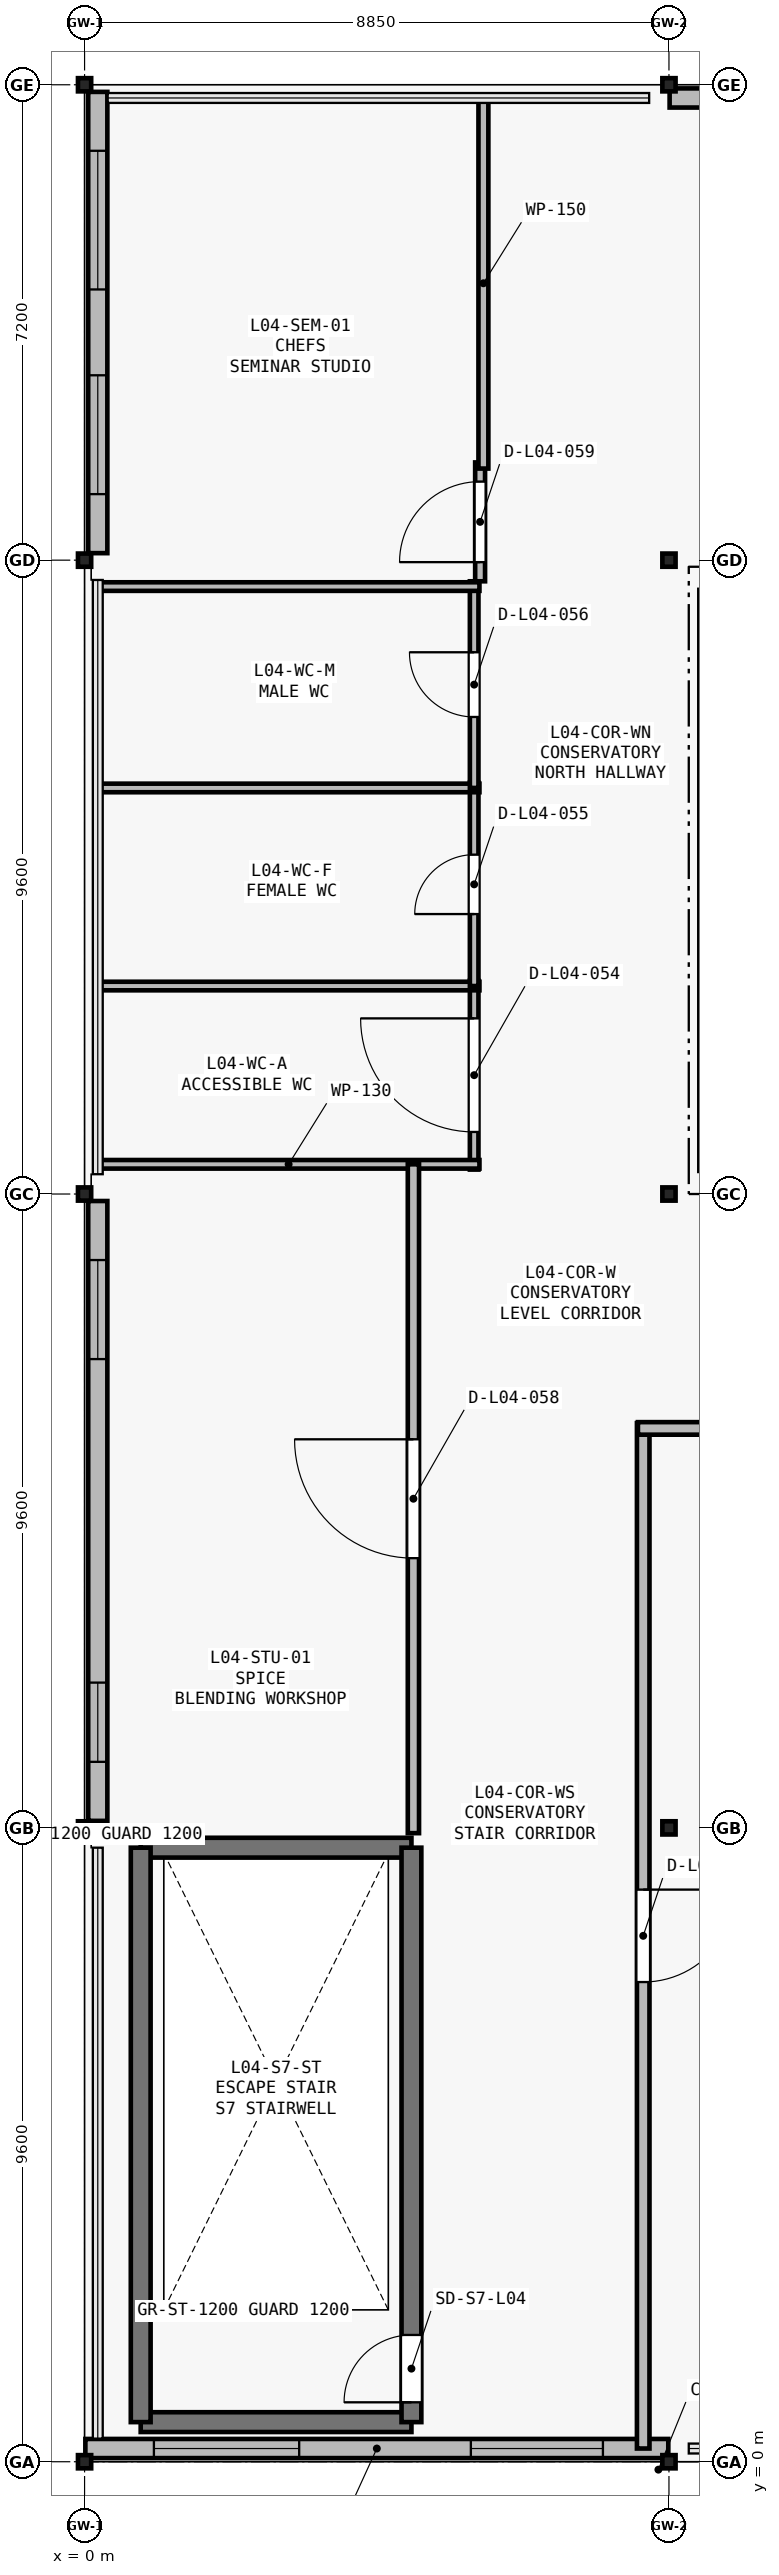
"""IFC4 building model, lengths in metres.
Left out: names, types, materials, properties, quantities, classifications, styles, units other than length and angle.
Written with IfcOpenShell. Run it as: python <this file> out.ifc"""

import sys

from ifc_helpers import new_model, si_unit, direction, frame, frame_2d, origin, origin_2d, place, context, subcontext, project, spatial, rectangle, i_section, extrude, element, fill, save


model = new_model("IFC4")
c1 = context("Model", 3, precision=1e-05, world=origin(), true_north=direction((0.0, 1.0)))
c2 = subcontext(c1, "Body", "Model", "MODEL_VIEW")
j1 = project(units=[si_unit("LENGTHUNIT", "METRE"), si_unit("PLANEANGLEUNIT", "RADIAN")], contexts=[c1])
p1 = place(None, origin())
s1 = spatial("IfcSite", under=j1, at=p1, CompositionType="ELEMENT")
p2 = place(p1, origin())
s2 = spatial("IfcBuilding", under=s1, at=p2, CompositionType="ELEMENT")
p3 = place(p2, frame((0.0, 0.0, 19.2)))
s3 = spatial("IfcBuildingStorey", under=s2, at=p3, CompositionType="ELEMENT", Elevation=19.2)
for number, where, z_axis, x_axis in (
    (1, (0.0, 0.0, 0.0), (0.0, 0.0, 1.0), (1.0, 0.0, 0.0)),
    (2, (0.0, 9.6, 0.0), (0.0, 0.0, 1.0), (1.0, 0.0, 0.0)),
    (3, (0.0, 19.2, 0.0), (0.0, 0.0, 1.0), (1.0, 0.0, 0.0)),
    (4, (0.0, 28.8, 0.0), (0.0, 0.0, 1.0), (1.0, 0.0, 0.0)),
    (5, (0.0, 36.0, 0.0), (0.0, 0.0, 1.0), (1.0, 0.0, 0.0)),
    (6, (8.85, 0.0, 0.0), (0.0, 0.0, 1.0), (1.0, 0.0, 0.0)),
    (7, (8.85, 9.6, 0.0), (0.0, 0.0, 1.0), (1.0, 0.0, 0.0)),
    (8, (8.85, 19.2, 0.0), (0.0, 0.0, 1.0), (1.0, 0.0, 0.0)),
    (9, (8.85, 28.8, 0.0), (0.0, 0.0, 1.0), (1.0, 0.0, 0.0)),
    (10, (8.85, 36.0, 0.0), (0.0, 0.0, 1.0), (1.0, 0.0, 0.0)),
):
    element("IfcColumn", number, at=place(p3, frame(where, z_axis=z_axis, x_axis=x_axis)), inside=s3, PredefinedType="COLUMN", context=c2, shape_type="SweptSolid", body=[
        extrude(i_section(OverallWidth=0.2, OverallDepth=0.2, WebThickness=0.008, FlangeThickness=0.012, FilletRadius=0.013, at=origin_2d()), origin(), (0.0, 0.0, 1.0), 4.2),
    ])
p4 = place(p3, frame((8.84, 0.2, 0.0), z_axis=(0.0, 0.0, 1.0), x_axis=(-1.0, 0.0, 0.0)))
e11 = element("IfcWall", 11, at=p4, inside=s3, PredefinedType="SOLIDWALL", context=c2, shape_type="SweptSolid", body=[
    extrude(rectangle(XDim=8.828, YDim=0.29, at=frame_2d((4.414, 0.0))), origin(), (0.0, 0.0, 1.0), 3.35),
])
p5 = place(p4, frame((0.99, 0.0, 0.95)))
e12 = element("IfcOpeningElement", 12, at=p5, cuts=e11, PredefinedType="OPENING", context=c2, shape_type="SweptSolid", body=[
    extrude(rectangle(XDim=2.0, YDim=2.1, at=frame_2d((1.0, 1.05))), frame((0.0, 0.155, 0.0), z_axis=(0.0, -1.0, 0.0), x_axis=(1.0, 0.0, 0.0)), (0.0, 0.0, 1.0), 0.31),
])
p6 = place(p4, frame((5.59, 0.0, 0.95)))
e13 = element("IfcOpeningElement", 13, at=p6, cuts=e11, PredefinedType="OPENING", context=c2, shape_type="SweptSolid", body=[
    extrude(rectangle(XDim=2.2, YDim=2.1, at=frame_2d((1.1, 1.05))), frame((0.0, 0.155, 0.0), z_axis=(0.0, -1.0, 0.0), x_axis=(1.0, 0.0, 0.0)), (0.0, 0.0, 1.0), 0.31),
])
p7 = place(p3, frame((0.2, 9.706, 0.0), z_axis=(0.0, 0.0, 1.0), x_axis=(0.0, 1.0, 0.0)))
e14 = element("IfcWall", 14, at=p7, inside=s3, PredefinedType="SOLIDWALL", context=c2, shape_type="SweptSolid", body=[
    extrude(rectangle(XDim=9.388, YDim=0.29, at=frame_2d((4.694, 0.0))), origin(), (0.0, 0.0, 1.0), 3.35),
])
p8 = place(p7, frame((0.894, 0.0, 0.95)))
e15 = element("IfcOpeningElement", 15, at=p8, cuts=e14, PredefinedType="OPENING", context=c2, shape_type="SweptSolid", body=[
    extrude(rectangle(XDim=1.2, YDim=1.2, at=frame_2d((0.6, 0.6))), frame((0.0, 0.155, 0.0), z_axis=(0.0, -1.0, 0.0), x_axis=(1.0, 0.0, 0.0)), (0.0, 0.0, 1.0), 0.31),
])
p9 = place(p7, frame((6.994, 0.0, 0.95)))
e16 = element("IfcOpeningElement", 16, at=p9, cuts=e14, PredefinedType="OPENING", context=c2, shape_type="SweptSolid", body=[
    extrude(rectangle(XDim=1.5, YDim=1.2, at=frame_2d((0.75, 0.6))), frame((0.0, 0.155, 0.0), z_axis=(0.0, -1.0, 0.0), x_axis=(1.0, 0.0, 0.0)), (0.0, 0.0, 1.0), 0.31),
])
p10 = place(p3, frame((0.2, 28.906, 0.0), z_axis=(0.0, 0.0, 1.0), x_axis=(0.0, 1.0, 0.0)))
e17 = element("IfcWall", 17, at=p10, inside=s3, PredefinedType="SOLIDWALL", context=c2, shape_type="SweptSolid", body=[
    extrude(rectangle(XDim=6.986, YDim=0.29, at=frame_2d((3.493, 0.0))), origin(), (0.0, 0.0, 1.0), 3.35),
])
p11 = place(p10, frame((0.894, 0.0, 0.95)))
e18 = element("IfcOpeningElement", 18, at=p11, cuts=e17, PredefinedType="OPENING", context=c2, shape_type="SweptSolid", body=[
    extrude(rectangle(XDim=1.8, YDim=1.2, at=frame_2d((0.9, 0.6))), frame((0.0, 0.155, 0.0), z_axis=(0.0, -1.0, 0.0), x_axis=(1.0, 0.0, 0.0)), (0.0, 0.0, 1.0), 0.31),
])
p12 = place(p10, frame((3.994, 0.0, 0.95)))
e19 = element("IfcOpeningElement", 19, at=p12, cuts=e17, PredefinedType="OPENING", context=c2, shape_type="SweptSolid", body=[
    extrude(rectangle(XDim=2.1, YDim=1.2, at=frame_2d((1.05, 0.6))), frame((0.0, 0.155, 0.0), z_axis=(0.0, -1.0, 0.0), x_axis=(1.0, 0.0, 0.0)), (0.0, 0.0, 1.0), 0.31),
])
p13 = place(p3, frame((8.86, 35.8, 0.0), z_axis=(0.0, 0.0, 1.0), x_axis=(1.0, 0.0, 0.0)))
e20 = element("IfcWall", 20, at=p13, inside=s3, PredefinedType="SOLIDWALL", context=c2, shape_type="SweptSolid", body=[
    extrude(rectangle(XDim=8.612, YDim=0.29, at=frame_2d((4.306, 0.0))), origin(), (0.0, 0.0, 1.0), 3.35),
])
p14 = place(p13, frame((0.99, 0.0, 0.95)))
e21 = element("IfcOpeningElement", 21, at=p14, cuts=e20, PredefinedType="OPENING", context=c2, shape_type="SweptSolid", body=[
    extrude(rectangle(XDim=0.85, YDim=1.5, at=frame_2d((0.425, 0.75))), frame((0.0, 0.155, 0.0), z_axis=(0.0, -1.0, 0.0), x_axis=(1.0, 0.0, 0.0)), (0.0, 0.0, 1.0), 0.31),
])
p15 = place(p13, frame((6.69, 0.0, 0.95)))
e22 = element("IfcOpeningElement", 22, at=p15, cuts=e20, PredefinedType="OPENING", context=c2, shape_type="SweptSolid", body=[
    extrude(rectangle(XDim=1.15, YDim=1.5, at=frame_2d((0.575, 0.75))), frame((0.0, 0.155, 0.0), z_axis=(0.0, -1.0, 0.0), x_axis=(1.0, 0.0, 0.0)), (0.0, 0.0, 1.0), 0.31),
])
for number, where, z_axis, x_axis in (
    (23, (0.85, 0.6, 0.0), (0.0, 0.0, 1.0), (1.0, 0.0, 0.0)),
    (24, (4.95, 9.3, 0.0), (0.0, 0.0, 1.0), (-1.0, 0.0, 0.0)),
):
    element("IfcWall", number, at=place(p3, frame(where, z_axis=z_axis, x_axis=x_axis)), inside=s3, PredefinedType="SHEAR", context=c2, shape_type="SweptSolid", body=[
        extrude(rectangle(XDim=4.1, YDim=0.3, at=frame_2d((2.05, 0.0))), origin(), (0.0, 0.0, 1.0), 4.2),
    ])
p16 = place(p3, frame((0.85, 9.3, 0.0), z_axis=(0.0, 0.0, 1.0), x_axis=(0.0, -1.0, 0.0)))
e25 = element("IfcWall", 25, at=p16, inside=s3, PredefinedType="SHEAR", context=c2, shape_type="SweptSolid", body=[
    extrude(rectangle(XDim=8.7, YDim=0.3, at=frame_2d((4.35, 0.0))), origin(), (0.0, 0.0, 1.0), 4.2),
])
p17 = place(p3, frame((4.95, 0.6, 0.0), z_axis=(0.0, 0.0, 1.0), x_axis=(0.0, 1.0, 0.0)))
e26 = element("IfcWall", 26, at=p17, inside=s3, PredefinedType="SHEAR", context=c2, shape_type="SweptSolid", body=[
    extrude(rectangle(XDim=8.7, YDim=0.3, at=frame_2d((4.35, 0.0))), origin(), (0.0, 0.0, 1.0), 4.2),
])
p18 = place(p17, frame((0.3, 0.0, 0.0)))
e27 = element("IfcOpeningElement", 27, at=p18, cuts=e26, PredefinedType="OPENING", context=c2, shape_type="SweptSolid", body=[
    extrude(rectangle(XDim=1.02, YDim=2.1, at=frame_2d((0.51, 1.05))), frame((0.0, 0.16, 0.0), z_axis=(0.0, -1.0, 0.0), x_axis=(1.0, 0.0, 0.0)), (0.0, 0.0, 1.0), 0.32),
])
p19 = place(p3, frame((5.9, 19.57, 0.0), z_axis=(0.0, 0.0, 1.0), x_axis=(0.0, 1.0, 0.0)))
e28 = element("IfcWall", 28, at=p19, inside=s3, PredefinedType="PARTITIONING", context=c2, shape_type="SweptSolid", body=[
    extrude(rectangle(XDim=2.86, YDim=0.13, at=frame_2d((1.43, 0.0))), origin(), (0.0, 0.0, 1.0), 3.55),
])
p20 = place(p19, frame((0.57, 0.0, 0.0)))
e29 = element("IfcOpeningElement", 29, at=p20, cuts=e28, PredefinedType="OPENING", context=c2, shape_type="SweptSolid", body=[
    extrude(rectangle(XDim=1.72, YDim=2.32, at=frame_2d((0.86, 1.16))), frame((0.0, 0.075, 0.0), z_axis=(0.0, -1.0, 0.0), x_axis=(1.0, 0.0, 0.0)), (0.0, 0.0, 1.0), 0.15),
])
for number, where, z_axis, x_axis in (
    (30, (0.2, 19.65, 0.0), (0.0, 0.0, 1.0), (1.0, 0.0, 0.0)),
    (31, (5.98, 22.35, 0.0), (0.0, 0.0, 1.0), (-1.0, 0.0, 0.0)),
):
    element("IfcWall", number, at=place(p3, frame(where, z_axis=z_axis, x_axis=x_axis)), inside=s3, PredefinedType="PARTITIONING", context=c2, shape_type="SweptSolid", body=[
        extrude(rectangle(XDim=5.78, YDim=0.13, at=frame_2d((2.89, 0.0))), origin(), (0.0, 0.0, 1.0), 3.72),
    ])
p21 = place(p3, frame((5.9, 22.35, 0.0), z_axis=(0.0, 0.0, 1.0), x_axis=(0.0, 1.0, 0.0)))
e32 = element("IfcWall", 32, at=p21, inside=s3, PredefinedType="PARTITIONING", context=c2, shape_type="SweptSolid", body=[
    extrude(rectangle(XDim=3.08, YDim=0.13, at=frame_2d((1.54, 0.0))), origin(), (0.0, 0.0, 1.0), 3.55),
])
p22 = place(p21, frame((1.09, 0.0, 0.0)))
e33 = element("IfcOpeningElement", 33, at=p22, cuts=e32, PredefinedType="OPENING", context=c2, shape_type="SweptSolid", body=[
    extrude(rectangle(XDim=0.9, YDim=2.36, at=frame_2d((0.45, 1.18))), frame((0.0, 0.075, 0.0), z_axis=(0.0, -1.0, 0.0), x_axis=(1.0, 0.0, 0.0)), (0.0, 0.0, 1.0), 0.15),
])
p23 = place(p3, frame((5.98, 25.35, 0.0), z_axis=(0.0, 0.0, 1.0), x_axis=(-1.0, 0.0, 0.0)))
e34 = element("IfcWall", 34, at=p23, inside=s3, PredefinedType="PARTITIONING", context=c2, shape_type="SweptSolid", body=[
    extrude(rectangle(XDim=5.78, YDim=0.13, at=frame_2d((2.89, 0.0))), origin(), (0.0, 0.0, 1.0), 3.72),
])
p24 = place(p3, frame((5.9, 25.35, 0.0), z_axis=(0.0, 0.0, 1.0), x_axis=(0.0, 1.0, 0.0)))
e35 = element("IfcWall", 35, at=p24, inside=s3, PredefinedType="PARTITIONING", context=c2, shape_type="SweptSolid", body=[
    extrude(rectangle(XDim=3.13, YDim=0.13, at=frame_2d((1.565, 0.0))), origin(), (0.0, 0.0, 1.0), 3.55),
])
p25 = place(p24, frame((1.075, 0.0, 0.0)))
e36 = element("IfcOpeningElement", 36, at=p25, cuts=e35, PredefinedType="OPENING", context=c2, shape_type="SweptSolid", body=[
    extrude(rectangle(XDim=0.98, YDim=2.36, at=frame_2d((0.49, 1.18))), frame((0.0, 0.075, 0.0), z_axis=(0.0, -1.0, 0.0), x_axis=(1.0, 0.0, 0.0)), (0.0, 0.0, 1.0), 0.15),
])
p26 = place(p3, frame((5.98, 28.4, 0.0), z_axis=(0.0, 0.0, 1.0), x_axis=(-1.0, 0.0, 0.0)))
e37 = element("IfcWall", 37, at=p26, inside=s3, PredefinedType="PARTITIONING", context=c2, shape_type="SweptSolid", body=[
    extrude(rectangle(XDim=5.78, YDim=0.13, at=frame_2d((2.89, 0.0))), origin(), (0.0, 0.0, 1.0), 3.72),
])
p27 = place(p3, frame((8.46, 15.73, 0.0), z_axis=(0.0, 0.0, 1.0), x_axis=(0.0, -1.0, 0.0)))
e38 = element("IfcWall", 38, at=p27, inside=s3, PredefinedType="PARTITIONING", context=c2, shape_type="SweptSolid", body=[
    extrude(rectangle(XDim=15.53, YDim=0.19, at=frame_2d((7.765, 0.0))), origin(), (0.0, 0.0, 1.0), 3.72),
])
p28 = place(p27, frame((7.065, 0.0, 0.0)))
e39 = element("IfcOpeningElement", 39, at=p28, cuts=e38, PredefinedType="OPENING", context=c2, shape_type="SweptSolid", body=[
    extrude(rectangle(XDim=1.4, YDim=2.38, at=frame_2d((0.7, 1.19))), frame((0.0, 0.105, 0.0), z_axis=(0.0, -1.0, 0.0), x_axis=(1.0, 0.0, 0.0)), (0.0, 0.0, 1.0), 0.21),
])
p29 = place(p3, frame((17.5, 15.65, 0.0), z_axis=(0.0, 0.0, 1.0), x_axis=(-1.0, 0.0, 0.0)))
e40 = element("IfcWall", 40, at=p29, inside=s3, PredefinedType="PARTITIONING", context=c2, shape_type="SweptSolid", body=[
    extrude(rectangle(XDim=9.12, YDim=0.19, at=frame_2d((4.56, 0.0))), origin(), (0.0, 0.0, 1.0), 3.72),
])
p30 = place(p3, frame((4.98, 9.52, 0.0), z_axis=(0.0, 0.0, 1.0), x_axis=(0.0, 1.0, 0.0)))
e41 = element("IfcWall", 41, at=p30, inside=s3, PredefinedType="PARTITIONING", context=c2, shape_type="SweptSolid", body=[
    extrude(rectangle(XDim=10.13, YDim=0.17, at=frame_2d((5.065, 0.0))), origin(), (0.0, 0.0, 1.0), 3.72),
])
p31 = place(p30, frame((4.165, 0.0, 0.0)))
e42 = element("IfcOpeningElement", 42, at=p31, cuts=e41, PredefinedType="OPENING", context=c2, shape_type="SweptSolid", body=[
    extrude(rectangle(XDim=1.8, YDim=2.42, at=frame_2d((0.9, 1.21))), frame((0.0, 0.095, 0.0), z_axis=(0.0, -1.0, 0.0), x_axis=(1.0, 0.0, 0.0)), (0.0, 0.0, 1.0), 0.19),
])
p32 = place(p3, frame((5.99, 28.48, 0.0), z_axis=(0.0, 0.0, 1.0), x_axis=(0.0, 1.0, 0.0)))
e43 = element("IfcWall", 43, at=p32, inside=s3, PredefinedType="PARTITIONING", context=c2, shape_type="SweptSolid", body=[
    extrude(rectangle(XDim=1.8, YDim=0.15, at=frame_2d((0.9, 0.0))), origin(), (0.0, 0.0, 1.0), 3.65),
])
p33 = place(p32, frame((0.29, 0.0, 0.0)))
e44 = element("IfcOpeningElement", 44, at=p33, cuts=e43, PredefinedType="OPENING", context=c2, shape_type="SweptSolid", body=[
    extrude(rectangle(XDim=1.22, YDim=2.36, at=frame_2d((0.61, 1.18))), frame((0.0, 0.085, 0.0), z_axis=(0.0, -1.0, 0.0), x_axis=(1.0, 0.0, 0.0)), (0.0, 0.0, 1.0), 0.17),
])
p34 = place(p3, frame((6.04, 30.187, 0.0), z_axis=(0.0, 0.0, 1.0), x_axis=(0.0, 1.0, 0.0)))
e45 = element("IfcWall", 45, at=p34, inside=s3, PredefinedType="PARTITIONING", context=c2, shape_type="SweptSolid", body=[
    extrude(rectangle(XDim=5.613, YDim=0.15, at=frame_2d((2.807, 0.0))), origin(), (0.0, 0.0, 1.0), 3.65),
])
p35 = place(p5, origin())
e46 = element("IfcWindow", 46, at=p35, inside=s3, PartitioningType="SINGLE_PANEL", PredefinedType="WINDOW", context=c2, shape_type="SweptSolid", body=[
    extrude(rectangle(XDim=2.0, YDim=2.1, at=frame_2d((1.0, 1.05))), frame((0.0, 0.03, 0.0), z_axis=(0.0, -1.0, 0.0), x_axis=(1.0, 0.0, 0.0)), (0.0, 0.0, 1.0), 0.06),
])
fill(e12, e46)
p36 = place(p6, origin())
e47 = element("IfcWindow", 47, at=p36, inside=s3, PartitioningType="SINGLE_PANEL", PredefinedType="WINDOW", context=c2, shape_type="SweptSolid", body=[
    extrude(rectangle(XDim=2.2, YDim=2.1, at=frame_2d((1.1, 1.05))), frame((0.0, 0.03, 0.0), z_axis=(0.0, -1.0, 0.0), x_axis=(1.0, 0.0, 0.0)), (0.0, 0.0, 1.0), 0.06),
])
fill(e13, e47)
p37 = place(p8, origin())
e48 = element("IfcWindow", 48, at=p37, inside=s3, PartitioningType="SINGLE_PANEL", PredefinedType="WINDOW", context=c2, shape_type="SweptSolid", body=[
    extrude(rectangle(XDim=1.2, YDim=1.2, at=frame_2d((0.6, 0.6))), frame((0.0, 0.03, 0.0), z_axis=(0.0, -1.0, 0.0), x_axis=(1.0, 0.0, 0.0)), (0.0, 0.0, 1.0), 0.06),
])
fill(e15, e48)
p38 = place(p9, origin())
e49 = element("IfcWindow", 49, at=p38, inside=s3, PartitioningType="SINGLE_PANEL", PredefinedType="WINDOW", context=c2, shape_type="SweptSolid", body=[
    extrude(rectangle(XDim=1.5, YDim=1.2, at=frame_2d((0.75, 0.6))), frame((0.0, 0.03, 0.0), z_axis=(0.0, -1.0, 0.0), x_axis=(1.0, 0.0, 0.0)), (0.0, 0.0, 1.0), 0.06),
])
fill(e16, e49)
p39 = place(p11, origin())
e50 = element("IfcWindow", 50, at=p39, inside=s3, PartitioningType="SINGLE_PANEL", PredefinedType="WINDOW", context=c2, shape_type="SweptSolid", body=[
    extrude(rectangle(XDim=1.8, YDim=1.2, at=frame_2d((0.9, 0.6))), frame((0.0, 0.03, 0.0), z_axis=(0.0, -1.0, 0.0), x_axis=(1.0, 0.0, 0.0)), (0.0, 0.0, 1.0), 0.06),
])
fill(e18, e50)
p40 = place(p12, origin())
e51 = element("IfcWindow", 51, at=p40, inside=s3, PartitioningType="SINGLE_PANEL", PredefinedType="WINDOW", context=c2, shape_type="SweptSolid", body=[
    extrude(rectangle(XDim=2.1, YDim=1.2, at=frame_2d((1.05, 0.6))), frame((0.0, 0.03, 0.0), z_axis=(0.0, -1.0, 0.0), x_axis=(1.0, 0.0, 0.0)), (0.0, 0.0, 1.0), 0.06),
])
fill(e19, e51)
p41 = place(p18, origin())
e52 = element("IfcDoor", 52, at=p41, inside=s3, OperationType="SINGLE_SWING_LEFT", PredefinedType="DOOR", context=c2, shape_type="SweptSolid", body=[
    extrude(rectangle(XDim=1.02, YDim=2.1, at=frame_2d((0.51, 1.05))), frame((0.0, 0.025, 0.0), z_axis=(0.0, -1.0, 0.0), x_axis=(1.0, 0.0, 0.0)), (0.0, 0.0, 1.0), 0.05),
])
fill(e27, e52)
p42 = place(p20, origin())
e53 = element("IfcDoor", 53, at=p42, inside=s3, OperationType="SINGLE_SWING_RIGHT", PredefinedType="DOOR", context=c2, shape_type="SweptSolid", body=[
    extrude(rectangle(XDim=1.72, YDim=2.32, at=frame_2d((0.86, 1.16))), frame((0.0, 0.025, 0.0), z_axis=(0.0, -1.0, 0.0), x_axis=(1.0, 0.0, 0.0)), (0.0, 0.0, 1.0), 0.05),
])
fill(e29, e53)
p43 = place(p22, origin())
e54 = element("IfcDoor", 54, at=p43, inside=s3, OperationType="SINGLE_SWING_LEFT", PredefinedType="DOOR", context=c2, shape_type="SweptSolid", body=[
    extrude(rectangle(XDim=0.9, YDim=2.36, at=frame_2d((0.45, 1.18))), frame((0.0, 0.025, 0.0), z_axis=(0.0, -1.0, 0.0), x_axis=(1.0, 0.0, 0.0)), (0.0, 0.0, 1.0), 0.05),
])
fill(e33, e54)
p44 = place(p25, origin())
e55 = element("IfcDoor", 55, at=p44, inside=s3, OperationType="SINGLE_SWING_RIGHT", PredefinedType="DOOR", context=c2, shape_type="SweptSolid", body=[
    extrude(rectangle(XDim=0.98, YDim=2.36, at=frame_2d((0.49, 1.18))), frame((0.0, 0.025, 0.0), z_axis=(0.0, -1.0, 0.0), x_axis=(1.0, 0.0, 0.0)), (0.0, 0.0, 1.0), 0.05),
])
fill(e36, e55)
p45 = place(p28, origin())
e56 = element("IfcDoor", 56, at=p45, inside=s3, OperationType="SINGLE_SWING_LEFT", PredefinedType="DOOR", context=c2, shape_type="SweptSolid", body=[
    extrude(rectangle(XDim=1.4, YDim=2.38, at=frame_2d((0.7, 1.19))), frame((0.0, 0.025, 0.0), z_axis=(0.0, -1.0, 0.0), x_axis=(1.0, 0.0, 0.0)), (0.0, 0.0, 1.0), 0.05),
])
fill(e39, e56)
p46 = place(p31, origin())
e57 = element("IfcDoor", 57, at=p46, inside=s3, OperationType="SINGLE_SWING_RIGHT", PredefinedType="DOOR", context=c2, shape_type="SweptSolid", body=[
    extrude(rectangle(XDim=1.8, YDim=2.42, at=frame_2d((0.9, 1.21))), frame((0.0, 0.025, 0.0), z_axis=(0.0, -1.0, 0.0), x_axis=(1.0, 0.0, 0.0)), (0.0, 0.0, 1.0), 0.05),
])
fill(e42, e57)
p47 = place(p33, origin())
e58 = element("IfcDoor", 58, at=p47, inside=s3, OperationType="SINGLE_SWING_LEFT", PredefinedType="DOOR", context=c2, shape_type="SweptSolid", body=[
    extrude(rectangle(XDim=1.22, YDim=2.36, at=frame_2d((0.61, 1.18))), frame((0.0, 0.025, 0.0), z_axis=(0.0, -1.0, 0.0), x_axis=(1.0, 0.0, 0.0)), (0.0, 0.0, 1.0), 0.05),
])
fill(e44, e58)
save(model, sys.argv[1])
